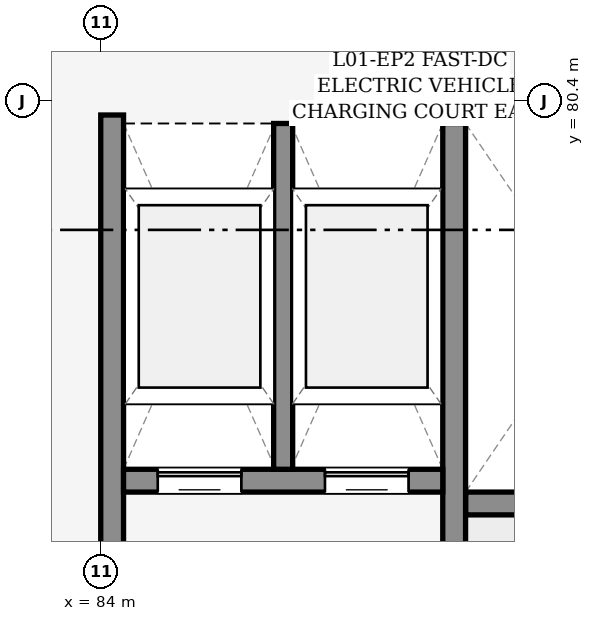
"""IFC4 building model, lengths in metres.
Left out: names, types, materials, properties, quantities, classifications, styles, units other than length and angle.
Written with IfcOpenShell. Run it as: python <this file> out.ifc"""

import sys

from ifc_helpers import new_model, si_unit, direction, frame, frame_2d, origin, origin_2d, place, context, subcontext, project, spatial, rectangle, i_section, extrude, element, fill, save


model = new_model("IFC4")
c1 = context("Model", 3, precision=1e-05, world=origin(), true_north=direction((0.0, 1.0)))
c2 = subcontext(c1, "Body", "Model", "MODEL_VIEW")
j1 = project(units=[si_unit("LENGTHUNIT", "METRE"), si_unit("PLANEANGLEUNIT", "RADIAN")], contexts=[c1])
p1 = place(None, origin())
s1 = spatial("IfcSite", under=j1, at=p1, CompositionType="ELEMENT")
p2 = place(p1, origin())
s2 = spatial("IfcBuilding", under=s1, at=p2, CompositionType="ELEMENT")
p3 = place(p2, frame((0.0, 0.0, 5.4)))
s3 = spatial("IfcBuildingStorey", under=s2, at=p3, CompositionType="ELEMENT", Elevation=5.4)
p4 = place(p3, frame((84.0, 80.4, 0.0), z_axis=(0.0, 0.0, 1.0), x_axis=(1.0, 0.0, 0.0)))
e1 = element("IfcColumn", 1, at=p4, inside=s3, PredefinedType="COLUMN", context=c2, shape_type="SweptSolid", body=[
    extrude(i_section(OverallWidth=0.395, OverallDepth=0.381, WebThickness=0.018, FlangeThickness=0.03, FilletRadius=0.015, at=origin_2d()), origin(), (0.0, 0.0, 1.0), 3.6),
])
p5 = place(p3, frame((84.196, 80.25, 0.0), z_axis=(0.0, 0.0, 1.0), x_axis=(1.0, 0.0, 0.0)))
e2 = element("IfcWall", 2, at=p5, inside=s3, PredefinedType="SHEAR", context=c2, shape_type="SweptSolid", body=[
    extrude(rectangle(XDim=8.009, YDim=0.3, at=frame_2d((4.004, 0.0))), origin(), (0.0, 0.0, 1.0), 3.38),
])
p6 = place(p3, frame((88.8, 75.1, 0.0), z_axis=(0.0, 0.0, 1.0), x_axis=(1.0, 0.0, 0.0)))
e3 = element("IfcWall", 3, at=p6, inside=s3, PredefinedType="SHEAR", context=c2, shape_type="SweptSolid", body=[
    extrude(rectangle(XDim=3.3, YDim=0.3, at=frame_2d((1.65, 0.0))), origin(), (0.0, 0.0, 1.0), 3.38),
])
p7 = place(p3, frame((84.15, 63.789, 0.0), z_axis=(0.0, 0.0, 1.0), x_axis=(0.0, 1.0, 0.0)))
e4 = element("IfcWall", 4, at=p7, inside=s3, PredefinedType="SHEAR", context=c2, shape_type="SweptSolid", body=[
    extrude(rectangle(XDim=16.423, YDim=0.3, at=frame_2d((8.211, 0.0))), origin(), (0.0, 0.0, 1.0), 3.38),
])
p8 = place(p7, frame((5.662, 0.0, 0.0)))
e5 = element("IfcOpeningElement", 5, at=p8, cuts=e4, PredefinedType="OPENING", context=c2, shape_type="SweptSolid", body=[
    extrude(rectangle(XDim=1.3, YDim=2.2, at=frame_2d((0.65, 1.1))), frame((0.0, 0.16, 0.0), z_axis=(0.0, -1.0, 0.0), x_axis=(1.0, 0.0, 0.0)), (0.0, 0.0, 1.0), 0.32),
])
p9 = place(p3, frame((88.65, 63.9, 0.0), z_axis=(0.0, 0.0, 1.0), x_axis=(0.0, 1.0, 0.0)))
e6 = element("IfcWall", 6, at=p9, inside=s3, PredefinedType="SHEAR", context=c2, shape_type="SweptSolid", body=[
    extrude(rectangle(XDim=16.2, YDim=0.3, at=frame_2d((8.1, 0.0))), origin(), (0.0, 0.0, 1.0), 3.38),
])
p10 = place(p9, frame((0.5, 0.0, 0.0)))
e7 = element("IfcOpeningElement", 7, at=p10, cuts=e6, PredefinedType="OPENING", context=c2, shape_type="SweptSolid", body=[
    extrude(rectangle(XDim=1.15, YDim=2.15, at=frame_2d((0.575, 1.075))), frame((0.0, 0.16, 0.0), z_axis=(0.0, -1.0, 0.0), x_axis=(1.0, 0.0, 0.0)), (0.0, 0.0, 1.0), 0.32),
])
p11 = place(p3, frame((84.3, 75.4, 0.0), z_axis=(0.0, 0.0, 1.0), x_axis=(1.0, 0.0, 0.0)))
e8 = element("IfcWall", 8, at=p11, inside=s3, PredefinedType="SHEAR", context=c2, shape_type="SweptSolid", body=[
    extrude(rectangle(XDim=4.2, YDim=0.3, at=frame_2d((2.1, 0.0))), origin(), (0.0, 0.0, 1.0), 3.38),
])
p12 = place(p11, frame((0.45, 0.0, 0.0)))
e9 = element("IfcOpeningElement", 9, at=p12, cuts=e8, PredefinedType="OPENING", context=c2, shape_type="SweptSolid", body=[
    extrude(rectangle(XDim=1.1, YDim=2.2, at=frame_2d((0.55, 1.1))), frame((0.0, 0.16, 0.0), z_axis=(0.0, -1.0, 0.0), x_axis=(1.0, 0.0, 0.0)), (0.0, 0.0, 1.0), 0.32),
])
p13 = place(p11, frame((2.65, 0.0, 0.0)))
e10 = element("IfcOpeningElement", 10, at=p13, cuts=e8, PredefinedType="OPENING", context=c2, shape_type="SweptSolid", body=[
    extrude(rectangle(XDim=1.1, YDim=2.2, at=frame_2d((0.55, 1.1))), frame((0.0, 0.16, 0.0), z_axis=(0.0, -1.0, 0.0), x_axis=(1.0, 0.0, 0.0)), (0.0, 0.0, 1.0), 0.32),
])
p14 = place(p3, frame((86.4, 75.55, 0.0), z_axis=(0.0, 0.0, 1.0), x_axis=(0.0, 1.0, 0.0)))
e11 = element("IfcWall", 11, at=p14, inside=s3, PredefinedType="PARTITIONING", context=c2, shape_type="SweptSolid", body=[
    extrude(rectangle(XDim=4.55, YDim=0.25, at=frame_2d((2.275, 0.0))), origin(), (0.0, 0.0, 1.0), 2.525),
])
p15 = place(p12, origin())
e12 = element("IfcDoor", 12, at=p15, inside=s3, OperationType="SLIDING_TO_LEFT", PredefinedType="DOOR", context=c2, shape_type="SweptSolid", body=[
    extrude(rectangle(XDim=1.1, YDim=2.2, at=frame_2d((0.55, 1.1))), frame((0.0, 0.025, 0.0), z_axis=(0.0, -1.0, 0.0), x_axis=(1.0, 0.0, 0.0)), (0.0, 0.0, 1.0), 0.05),
])
fill(e9, e12)
p16 = place(p13, origin())
e13 = element("IfcDoor", 13, at=p16, inside=s3, OperationType="SLIDING_TO_LEFT", PredefinedType="DOOR", context=c2, shape_type="SweptSolid", body=[
    extrude(rectangle(XDim=1.1, YDim=2.2, at=frame_2d((0.55, 1.1))), frame((0.0, 0.025, 0.0), z_axis=(0.0, -1.0, 0.0), x_axis=(1.0, 0.0, 0.0)), (0.0, 0.0, 1.0), 0.05),
])
fill(e10, e13)
save(model, sys.argv[1])
